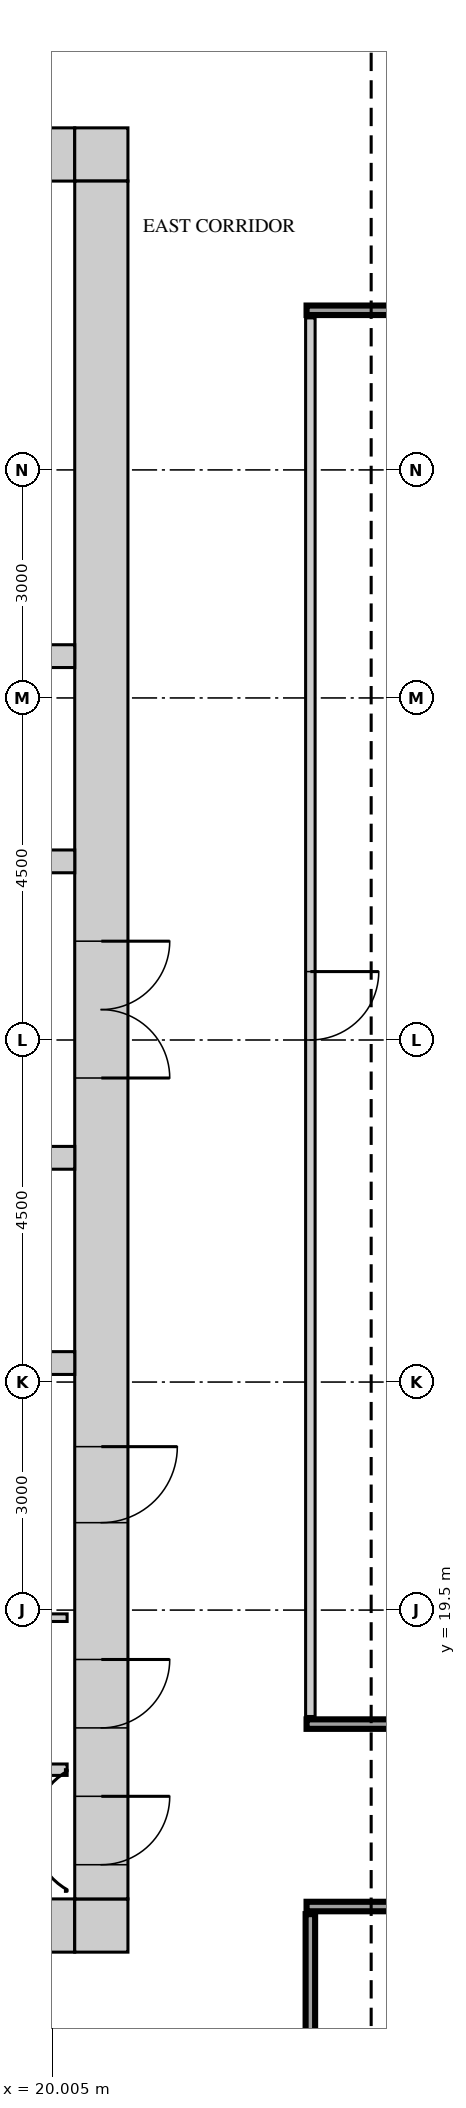
"""IFC4 building model, lengths in metres.
Left out: names, types, materials, properties, quantities, classifications, styles, units other than length and angle.
Written with IfcOpenShell. Run it as: python <this file> out.ifc"""

import sys

from ifc_helpers import new_model, si_unit, direction, frame, frame_2d, origin, place, context, subcontext, project, spatial, rectangle, extrude, source, transform, mapped, element, fill, save


model = new_model("IFC4")
c1 = context("Model", 3, precision=1e-05, world=origin(), true_north=direction((0.0, 1.0)))
c2 = subcontext(c1, "Body", "Model", "MODEL_VIEW")
j1 = project(units=[si_unit("LENGTHUNIT", "METRE"), si_unit("PLANEANGLEUNIT", "RADIAN")], contexts=[c1])
p1 = place(None, origin())
s1 = spatial("IfcSite", under=j1, at=p1, CompositionType="ELEMENT")
p2 = place(p1, origin())
s2 = spatial("IfcBuilding", under=s1, at=p2, CompositionType="ELEMENT")
p3 = place(p2, frame((0.0, 0.0, 258.2)))
s3 = spatial("IfcBuildingStorey", under=s2, at=p3, CompositionType="ELEMENT", Elevation=258.2)
m1 = source(origin(), c2, "Body", "SweptSolid", [
    extrude(rectangle(XDim=13.6, YDim=0.7, at=frame_2d((6.8, 0.0))), origin(), (0.0, 0.0, 1.0), 3.75),
])
p4 = place(p3, frame((6.7, 38.65, 0.0), z_axis=(0.0, 0.0, 1.0), x_axis=(1.0, 0.0, 0.0)))
e1 = element("IfcWall", 1, at=p4, inside=s3, PredefinedType="SHEAR", context=c2, shape_type="MappedRepresentation", body=[
    mapped(m1, transform((0.0, 0.0, 0.0))),
])
m2 = source(origin(), c2, "Body", "SweptSolid", [
    extrude(rectangle(XDim=0.9, YDim=2.1, at=frame_2d((0.45, 1.05))), frame((0.0, 0.36, 0.0), z_axis=(0.0, -1.0, 0.0), x_axis=(1.0, 0.0, 0.0)), (0.0, 0.0, 1.0), 0.72),
])
p5 = place(p4, frame((1.85, 0.0, 0.0)))
e2 = element("IfcOpeningElement", 2, at=p5, cuts=e1, PredefinedType="OPENING", context=c2, shape_type="MappedRepresentation", body=[
    mapped(m2, transform((0.0, 0.0, 0.0))),
])
p6 = place(p4, frame((8.55, 0.0, 0.0)))
e3 = element("IfcOpeningElement", 3, at=p6, cuts=e1, PredefinedType="OPENING", context=c2, shape_type="MappedRepresentation", body=[
    mapped(m2, transform((0.0, 0.0, 0.0))),
])
m3 = source(origin(), c2, "Body", "SweptSolid", [
    extrude(rectangle(XDim=0.7, YDim=0.7, at=frame_2d((0.35, 0.0))), origin(), (0.0, 0.0, 1.0), 3.75),
])
p7 = place(p3, frame((20.3, 38.65, 0.0), z_axis=(0.0, 0.0, 1.0), x_axis=(1.0, 0.0, 0.0)))
e4 = element("IfcWall", 4, at=p7, inside=s3, PredefinedType="SHEAR", context=c2, shape_type="MappedRepresentation", body=[
    mapped(m3, transform((0.0, 0.0, 0.0))),
])
p8 = place(p3, frame((6.7, 15.35, 0.0), z_axis=(0.0, 0.0, 1.0), x_axis=(1.0, 0.0, 0.0)))
e5 = element("IfcWall", 5, at=p8, inside=s3, PredefinedType="SHEAR", context=c2, shape_type="MappedRepresentation", body=[
    mapped(m1, transform((0.0, 0.0, 0.0))),
])
m4 = source(origin(), c2, "Body", "SweptSolid", [
    extrude(rectangle(XDim=1.2, YDim=2.1, at=frame_2d((0.6, 1.05))), frame((0.0, 0.36, 0.0), z_axis=(0.0, -1.0, 0.0), x_axis=(1.0, 0.0, 0.0)), (0.0, 0.0, 1.0), 0.72),
])
p9 = place(p8, frame((5.5, 0.0, 0.0)))
e6 = element("IfcOpeningElement", 6, at=p9, cuts=e5, PredefinedType="OPENING", context=c2, shape_type="MappedRepresentation", body=[
    mapped(m4, transform((0.0, 0.0, 0.0))),
])
p10 = place(p8, frame((2.15, 0.0, 0.0)))
e7 = element("IfcOpeningElement", 7, at=p10, cuts=e5, PredefinedType="OPENING", context=c2, shape_type="MappedRepresentation", body=[
    mapped(m4, transform((0.0, 0.0, 0.0))),
])
m5 = source(origin(), c2, "Body", "SweptSolid", [
    extrude(rectangle(XDim=1.0, YDim=2.1, at=frame_2d((0.5, 1.05))), frame((0.0, 0.36, 0.0), z_axis=(0.0, -1.0, 0.0), x_axis=(1.0, 0.0, 0.0)), (0.0, 0.0, 1.0), 0.72),
])
p11 = place(p8, frame((8.0, 0.0, 0.0)))
e8 = element("IfcOpeningElement", 8, at=p11, cuts=e5, PredefinedType="OPENING", context=c2, shape_type="MappedRepresentation", body=[
    mapped(m5, transform((0.0, 0.0, 0.0))),
])
p12 = place(p3, frame((20.3, 15.35, 0.0), z_axis=(0.0, 0.0, 1.0), x_axis=(1.0, 0.0, 0.0)))
e9 = element("IfcWall", 9, at=p12, inside=s3, PredefinedType="SHEAR", context=c2, shape_type="MappedRepresentation", body=[
    mapped(m3, transform((0.0, 0.0, 0.0))),
])
m6 = source(origin(), c2, "Body", "SweptSolid", [
    extrude(rectangle(XDim=22.6, YDim=0.7, at=frame_2d((11.3, 0.0))), origin(), (0.0, 0.0, 1.0), 3.75),
])
p13 = place(p3, frame((20.65, 15.7, 0.0), z_axis=(0.0, 0.0, 1.0), x_axis=(0.0, 1.0, 0.0)))
e10 = element("IfcWall", 10, at=p13, inside=s3, PredefinedType="SHEAR", context=c2, shape_type="MappedRepresentation", body=[
    mapped(m6, transform((0.0, 0.0, 0.0))),
])
m7 = source(origin(), c2, "Body", "SweptSolid", [
    extrude(rectangle(XDim=1.8, YDim=2.1, at=frame_2d((0.9, 1.05))), frame((0.0, 0.36, 0.0), z_axis=(0.0, -1.0, 0.0), x_axis=(1.0, 0.0, 0.0)), (0.0, 0.0, 1.0), 0.72),
])
p14 = place(p13, frame((10.8, 0.0, 0.0)))
e11 = element("IfcOpeningElement", 11, at=p14, cuts=e10, PredefinedType="OPENING", context=c2, shape_type="MappedRepresentation", body=[
    mapped(m7, transform((0.0, 0.0, 0.0))),
])
p15 = place(p13, frame((0.45, 0.0, 0.0)))
e12 = element("IfcOpeningElement", 12, at=p15, cuts=e10, PredefinedType="OPENING", context=c2, shape_type="MappedRepresentation", body=[
    mapped(m2, transform((0.0, 0.0, 0.0))),
])
p16 = place(p13, frame((2.25, 0.0, 0.0)))
e13 = element("IfcOpeningElement", 13, at=p16, cuts=e10, PredefinedType="OPENING", context=c2, shape_type="MappedRepresentation", body=[
    mapped(m2, transform((0.0, 0.0, 0.0))),
])
p17 = place(p13, frame((4.95, 0.0, 0.0)))
e14 = element("IfcOpeningElement", 14, at=p17, cuts=e10, PredefinedType="OPENING", context=c2, shape_type="MappedRepresentation", body=[
    mapped(m5, transform((0.0, 0.0, 0.0))),
])
m8 = source(origin(), c2, "Body", "SweptSolid", [
    extrude(rectangle(XDim=13.6, YDim=0.3, at=frame_2d((6.8, 0.0))), origin(), (0.0, 0.0, 1.0), 3.75),
])
for number, where, z_axis, x_axis in (
    (15, (6.7, 22.75, 0.0), (0.0, 0.0, 1.0), (1.0, 0.0, 0.0)),
    (16, (6.7, 32.05, 0.0), (0.0, 0.0, 1.0), (1.0, 0.0, 0.0)),
):
    element("IfcWall", number, at=place(p3, frame(where, z_axis=z_axis, x_axis=x_axis)), inside=s3, PredefinedType="STANDARD", context=c2, shape_type="MappedRepresentation", body=[
        mapped(m8, transform((0.0, 0.0, 0.0))),
    ])
p18 = place(p3, frame((6.7, 29.35, 0.0), z_axis=(0.0, 0.0, 1.0), x_axis=(1.0, 0.0, 0.0)))
e17 = element("IfcWall", 17, at=p18, inside=s3, PredefinedType="STANDARD", context=c2, shape_type="MappedRepresentation", body=[
    mapped(m8, transform((0.0, 0.0, 0.0))),
])
m9 = source(origin(), c2, "Body", "SweptSolid", [
    extrude(rectangle(XDim=1.2, YDim=2.1, at=frame_2d((0.6, 1.05))), frame((0.0, 0.16, 0.0), z_axis=(0.0, -1.0, 0.0), x_axis=(1.0, 0.0, 0.0)), (0.0, 0.0, 1.0), 0.32),
])
p19 = place(p18, frame((1.05, 0.0, 0.0)))
e18 = element("IfcOpeningElement", 18, at=p19, cuts=e17, PredefinedType="OPENING", context=c2, shape_type="MappedRepresentation", body=[
    mapped(m9, transform((0.0, 0.0, 0.0))),
])
p20 = place(p18, frame((3.6, 0.0, 0.0)))
e19 = element("IfcOpeningElement", 19, at=p20, cuts=e17, PredefinedType="OPENING", context=c2, shape_type="MappedRepresentation", body=[
    mapped(m9, transform((0.0, 0.0, 0.0))),
])
p21 = place(p18, frame((6.15, 0.0, 0.0)))
e20 = element("IfcOpeningElement", 20, at=p21, cuts=e17, PredefinedType="OPENING", context=c2, shape_type="MappedRepresentation", body=[
    mapped(m9, transform((0.0, 0.0, 0.0))),
])
p22 = place(p18, frame((8.7, 0.0, 0.0)))
e21 = element("IfcOpeningElement", 21, at=p22, cuts=e17, PredefinedType="OPENING", context=c2, shape_type="MappedRepresentation", body=[
    mapped(m9, transform((0.0, 0.0, 0.0))),
])
p23 = place(p18, frame((11.25, 0.0, 0.0)))
e22 = element("IfcOpeningElement", 22, at=p23, cuts=e17, PredefinedType="OPENING", context=c2, shape_type="MappedRepresentation", body=[
    mapped(m9, transform((0.0, 0.0, 0.0))),
])
p24 = place(p3, frame((6.7, 25.45, 0.0), z_axis=(0.0, 0.0, 1.0), x_axis=(1.0, 0.0, 0.0)))
e23 = element("IfcWall", 23, at=p24, inside=s3, PredefinedType="STANDARD", context=c2, shape_type="MappedRepresentation", body=[
    mapped(m8, transform((0.0, 0.0, 0.0))),
])
p25 = place(p24, frame((1.05, 0.0, 0.0)))
e24 = element("IfcOpeningElement", 24, at=p25, cuts=e23, PredefinedType="OPENING", context=c2, shape_type="MappedRepresentation", body=[
    mapped(m9, transform((0.0, 0.0, 0.0))),
])
p26 = place(p24, frame((3.6, 0.0, 0.0)))
e25 = element("IfcOpeningElement", 25, at=p26, cuts=e23, PredefinedType="OPENING", context=c2, shape_type="MappedRepresentation", body=[
    mapped(m9, transform((0.0, 0.0, 0.0))),
])
p27 = place(p24, frame((6.15, 0.0, 0.0)))
e26 = element("IfcOpeningElement", 26, at=p27, cuts=e23, PredefinedType="OPENING", context=c2, shape_type="MappedRepresentation", body=[
    mapped(m9, transform((0.0, 0.0, 0.0))),
])
p28 = place(p24, frame((8.7, 0.0, 0.0)))
e27 = element("IfcOpeningElement", 27, at=p28, cuts=e23, PredefinedType="OPENING", context=c2, shape_type="MappedRepresentation", body=[
    mapped(m9, transform((0.0, 0.0, 0.0))),
])
p29 = place(p24, frame((11.25, 0.0, 0.0)))
e28 = element("IfcOpeningElement", 28, at=p29, cuts=e23, PredefinedType="OPENING", context=c2, shape_type="MappedRepresentation", body=[
    mapped(m9, transform((0.0, 0.0, 0.0))),
])
m10 = source(origin(), c2, "Body", "SweptSolid", [
    extrude(rectangle(XDim=10.85, YDim=0.125, at=frame_2d((5.425, 0.0))), origin(), (0.0, 0.0, 1.0), 3.8),
])
p30 = place(p3, frame((23.4, 4.65, 0.0), z_axis=(0.0, 0.0, 1.0), x_axis=(0.0, 1.0, 0.0)))
e29 = element("IfcWall", 29, at=p30, inside=s3, PredefinedType="PARTITIONING", context=c2, shape_type="MappedRepresentation", body=[
    mapped(m10, transform((0.0, 0.0, 0.0))),
])
m11 = source(origin(), c2, "Body", "SweptSolid", [
    extrude(rectangle(XDim=0.9, YDim=2.1, at=frame_2d((0.45, 1.05))), frame((0.0, 0.073, 0.0), z_axis=(0.0, -1.0, 0.0), x_axis=(1.0, 0.0, 0.0)), (0.0, 0.0, 1.0), 0.145),
])
p31 = place(p30, frame((4.5, 0.0, 0.0)))
e30 = element("IfcOpeningElement", 30, at=p31, cuts=e29, PredefinedType="OPENING", context=c2, shape_type="MappedRepresentation", body=[
    mapped(m11, transform((0.0, 0.0, 0.0))),
])
m12 = source(origin(), c2, "Body", "SweptSolid", [
    extrude(rectangle(XDim=26.0, YDim=0.125, at=frame_2d((13.0, 0.0))), origin(), (0.0, 0.0, 1.0), 3.8),
])
p32 = place(p3, frame((23.35, 15.6, 0.0), z_axis=(0.0, 0.0, 1.0), x_axis=(1.0, 0.0, 0.0)))
e31 = element("IfcWall", 31, at=p32, inside=s3, PredefinedType="PARTITIONING", context=c2, shape_type="MappedRepresentation", body=[
    mapped(m12, transform((0.0, 0.0, 0.0))),
])
m13 = source(origin(), c2, "Body", "SweptSolid", [
    extrude(rectangle(XDim=1.2, YDim=2.1, at=frame_2d((0.6, 1.05))), frame((0.0, 0.073, 0.0), z_axis=(0.0, -1.0, 0.0), x_axis=(1.0, 0.0, 0.0)), (0.0, 0.0, 1.0), 0.145),
])
p33 = place(p32, frame((16.55, 0.0, 0.0)))
e32 = element("IfcOpeningElement", 32, at=p33, cuts=e31, PredefinedType="OPENING", context=c2, shape_type="MappedRepresentation", body=[
    mapped(m13, transform((0.0, 0.0, 0.0))),
])
m14 = source(origin(), c2, "Body", "SweptSolid", [
    extrude(rectangle(XDim=4.0, YDim=0.15, at=frame_2d((2.0, 0.0))), origin(), (0.0, 0.0, 1.0), 3.8),
])
p34 = place(p3, frame((16.2, 17.4, 0.0), z_axis=(0.0, 0.0, 1.0), x_axis=(1.0, 0.0, 0.0)))
e33 = element("IfcWall", 33, at=p34, inside=s3, PredefinedType="PARTITIONING", context=c2, shape_type="MappedRepresentation", body=[
    mapped(m14, transform((0.0, 0.0, 0.0))),
])
p35 = place(p3, frame((23.35, 18.0, 0.0), z_axis=(0.0, 0.0, 1.0), x_axis=(1.0, 0.0, 0.0)))
e34 = element("IfcWall", 34, at=p35, inside=s3, PredefinedType="PARTITIONING", context=c2, shape_type="MappedRepresentation", body=[
    mapped(m12, transform((0.0, 0.0, 0.0))),
])
p36 = place(p35, frame((8.5, 0.0, 0.0)))
e35 = element("IfcOpeningElement", 35, at=p36, cuts=e34, PredefinedType="OPENING", context=c2, shape_type="MappedRepresentation", body=[
    mapped(m13, transform((0.0, 0.0, 0.0))),
])
p37 = place(p35, frame((15.3, 0.0, 0.0)))
e36 = element("IfcOpeningElement", 36, at=p37, cuts=e34, PredefinedType="OPENING", context=c2, shape_type="MappedRepresentation", body=[
    mapped(m11, transform((0.0, 0.0, 0.0))),
])
p38 = place(p35, frame((21.8, 0.0, 0.0)))
e37 = element("IfcOpeningElement", 37, at=p38, cuts=e34, PredefinedType="OPENING", context=c2, shape_type="MappedRepresentation", body=[
    mapped(m13, transform((0.0, 0.0, 0.0))),
])
m15 = source(origin(), c2, "Body", "SweptSolid", [
    extrude(rectangle(XDim=18.4, YDim=0.125, at=frame_2d((9.2, 0.0))), origin(), (0.0, 0.0, 1.0), 3.8),
])
p39 = place(p3, frame((23.4, 18.1, 0.0), z_axis=(0.0, 0.0, 1.0), x_axis=(0.0, 1.0, 0.0)))
e38 = element("IfcWall", 38, at=p39, inside=s3, PredefinedType="PARTITIONING", context=c2, shape_type="MappedRepresentation", body=[
    mapped(m15, transform((0.0, 0.0, 0.0))),
])
p40 = place(p39, frame((8.9, 0.0, 0.0)))
e39 = element("IfcOpeningElement", 39, at=p40, cuts=e38, PredefinedType="OPENING", context=c2, shape_type="MappedRepresentation", body=[
    mapped(m11, transform((0.0, 0.0, 0.0))),
])
m16 = source(origin(), c2, "Body", "SweptSolid", [
    extrude(rectangle(XDim=4.1, YDim=0.1, at=frame_2d((2.05, 0.0))), origin(), (0.0, 0.0, 1.0), 3.8),
])
p41 = place(p3, frame((16.1, 19.4, 0.0), z_axis=(0.0, 0.0, 1.0), x_axis=(1.0, 0.0, 0.0)))
e40 = element("IfcWall", 40, at=p41, inside=s3, PredefinedType="PARTITIONING", context=c2, shape_type="MappedRepresentation", body=[
    mapped(m16, transform((0.0, 0.0, 0.0))),
])
p42 = place(p3, frame((23.35, 36.6, 0.0), z_axis=(0.0, 0.0, 1.0), x_axis=(1.0, 0.0, 0.0)))
e41 = element("IfcWall", 41, at=p42, inside=s3, PredefinedType="PARTITIONING", context=c2, shape_type="MappedRepresentation", body=[
    mapped(m12, transform((0.0, 0.0, 0.0))),
])
m17 = source(origin(), c2, "Body", "SweptSolid", [
    extrude(rectangle(XDim=1.8, YDim=2.1, at=frame_2d((0.9, 1.05))), frame((0.0, 0.3, 0.0), z_axis=(0.0, -1.0, 0.0), x_axis=(1.0, 0.0, 0.0)), (0.0, 0.0, 1.0), 0.6),
])
p43 = place(p14, origin())
e42 = element("IfcDoor", 42, at=p43, inside=s3, OperationType="DOUBLE_DOOR_SINGLE_SWING", PredefinedType="DOOR", context=c2, shape_type="MappedRepresentation", body=[
    mapped(m17, transform((0.0, 0.0, 0.0))),
])
fill(e11, e42)
m18 = source(origin(), c2, "Body", "SweptSolid", [
    extrude(rectangle(XDim=0.9, YDim=2.1, at=frame_2d((0.45, 1.05))), frame((0.0, 0.3, 0.0), z_axis=(0.0, -1.0, 0.0), x_axis=(1.0, 0.0, 0.0)), (0.0, 0.0, 1.0), 0.6),
])
p44 = place(p15, origin())
e43 = element("IfcDoor", 43, at=p44, inside=s3, OperationType="SINGLE_SWING_RIGHT", PredefinedType="DOOR", context=c2, shape_type="MappedRepresentation", body=[
    mapped(m18, transform((0.0, 0.0, 0.0))),
])
fill(e12, e43)
p45 = place(p16, origin())
e44 = element("IfcDoor", 44, at=p45, inside=s3, OperationType="SINGLE_SWING_RIGHT", PredefinedType="DOOR", context=c2, shape_type="MappedRepresentation", body=[
    mapped(m18, transform((0.0, 0.0, 0.0))),
])
fill(e13, e44)
m19 = source(origin(), c2, "Body", "SweptSolid", [
    extrude(rectangle(XDim=1.0, YDim=2.1, at=frame_2d((0.5, 1.05))), frame((0.0, 0.3, 0.0), z_axis=(0.0, -1.0, 0.0), x_axis=(1.0, 0.0, 0.0)), (0.0, 0.0, 1.0), 0.6),
])
p46 = place(p17, origin())
e45 = element("IfcDoor", 45, at=p46, inside=s3, OperationType="SINGLE_SWING_RIGHT", PredefinedType="DOOR", context=c2, shape_type="MappedRepresentation", body=[
    mapped(m19, transform((0.0, 0.0, 0.0))),
])
fill(e14, e45)
m20 = source(origin(), c2, "Body", "SweptSolid", [
    extrude(rectangle(XDim=0.9, YDim=2.1, at=frame_2d((0.45, 1.05))), frame((0.0, 0.025, 0.0), z_axis=(0.0, -1.0, 0.0), x_axis=(1.0, 0.0, 0.0)), (0.0, 0.0, 1.0), 0.05),
])
p47 = place(p40, origin())
e46 = element("IfcDoor", 46, at=p47, inside=s3, OperationType="SINGLE_SWING_RIGHT", PredefinedType="DOOR", context=c2, shape_type="MappedRepresentation", body=[
    mapped(m20, transform((0.0, 0.0, 0.0))),
])
fill(e39, e46)
save(model, sys.argv[1])
